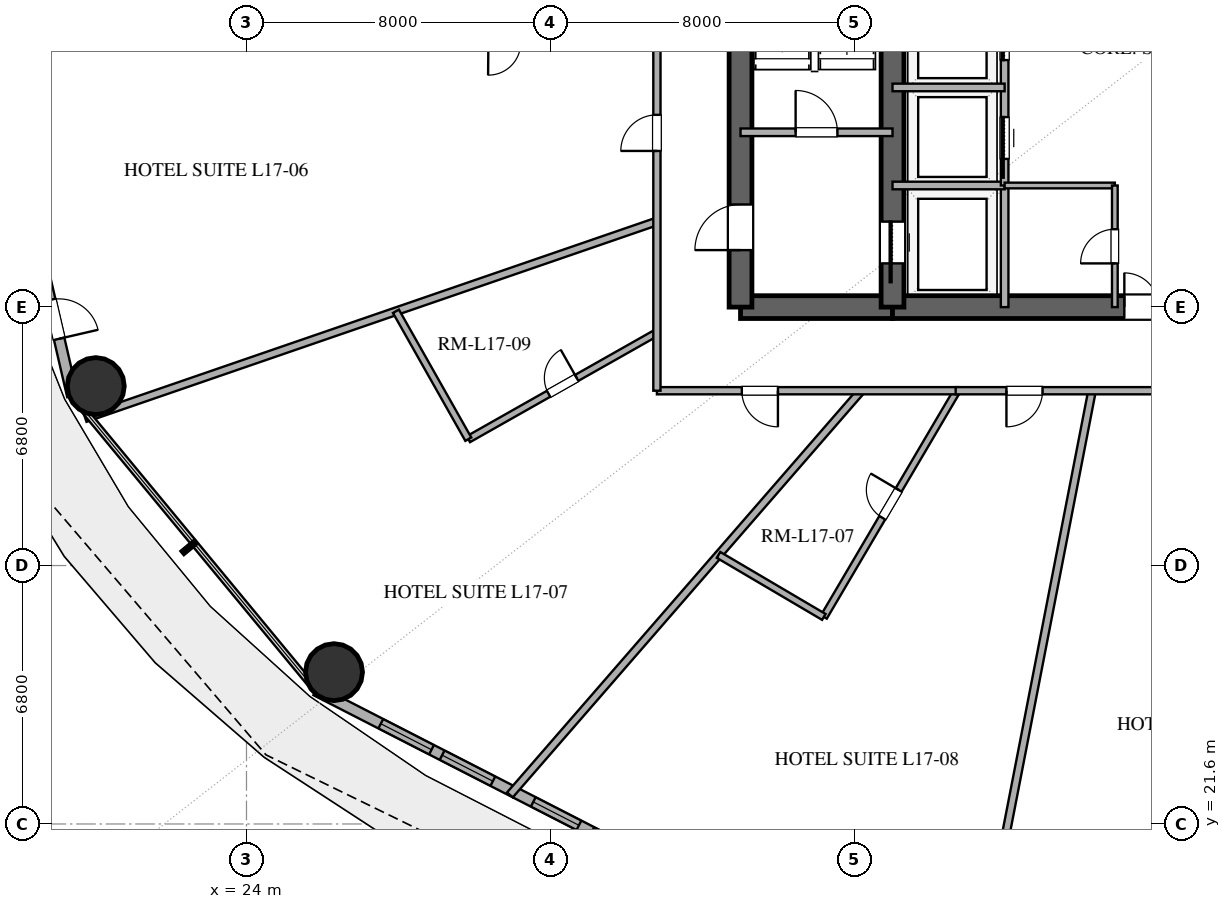
"""IFC4 building model, lengths in metres.
Left out: names, types, materials, properties, quantities, classifications, styles, units other than length and angle.
Written with IfcOpenShell. Run it as: python <this file> out.ifc"""

import sys

from ifc_helpers import new_model, si_unit, direction, frame, frame_2d, origin, origin_2d, place, context, subcontext, project, spatial, rectangle, hollow_circle, extrude, element, fill, save


model = new_model("IFC4")
c1 = context("Model", 3, precision=1e-05, world=origin(), true_north=direction((0.0, 1.0)))
c2 = subcontext(c1, "Body", "Model", "MODEL_VIEW")
j1 = project(units=[si_unit("LENGTHUNIT", "METRE"), si_unit("PLANEANGLEUNIT", "RADIAN")], contexts=[c1])
p1 = place(None, origin())
s1 = spatial("IfcSite", under=j1, at=p1, CompositionType="ELEMENT")
p2 = place(p1, origin())
s2 = spatial("IfcBuilding", under=s1, at=p2, CompositionType="ELEMENT")
p3 = place(p2, frame((0.0, 0.0, 71.4)))
s3 = spatial("IfcBuildingStorey", under=s2, at=p3, CompositionType="ELEMENT", Elevation=71.4)
p4 = place(p3, frame((37.0, 35.2, 0.0), z_axis=(0.0, 0.0, 1.0), x_axis=(1.0, 0.0, 0.0)))
e1 = element("IfcWall", 1, at=p4, inside=s3, PredefinedType="SHEAR", context=c2, shape_type="SweptSolid", body=[
    extrude(rectangle(XDim=4.0, YDim=0.6, at=frame_2d((2.0, 0.0))), origin(), (0.0, 0.0, 1.0), 3.38),
])
p5 = place(p3, frame((41.0, 35.2, 0.0), z_axis=(0.0, 0.0, 1.0), x_axis=(1.0, 0.0, 0.0)))
e2 = element("IfcWall", 2, at=p5, inside=s3, PredefinedType="SHEAR", context=c2, shape_type="SweptSolid", body=[
    extrude(rectangle(XDim=14.0, YDim=0.6, at=frame_2d((7.0, 0.0))), origin(), (0.0, 0.0, 1.0), 3.38),
])
p6 = place(p5, frame((6.1, 0.0, 0.0)))
e3 = element("IfcOpeningElement", 3, at=p6, cuts=e2, PredefinedType="OPENING", context=c2, shape_type="SweptSolid", body=[
    extrude(rectangle(XDim=1.8, YDim=2.25, at=frame_2d((0.9, 1.125))), frame((0.0, 0.31, 0.0), z_axis=(0.0, -1.0, 0.0), x_axis=(1.0, 0.0, 0.0)), (0.0, 0.0, 1.0), 0.62),
])
p7 = place(p3, frame((37.0, 35.2, 0.0), z_axis=(0.0, 0.0, 1.0), x_axis=(0.0, 1.0, 0.0)))
e4 = element("IfcWall", 4, at=p7, inside=s3, PredefinedType="SHEAR", context=c2, shape_type="SweptSolid", body=[
    extrude(rectangle(XDim=13.6, YDim=0.6, at=frame_2d((6.8, 0.0))), origin(), (0.0, 0.0, 1.0), 3.38),
])
p8 = place(p7, frame((1.5, 0.0, 0.0)))
e5 = element("IfcOpeningElement", 5, at=p8, cuts=e4, PredefinedType="OPENING", context=c2, shape_type="SweptSolid", body=[
    extrude(rectangle(XDim=1.2, YDim=2.15, at=frame_2d((0.6, 1.075))), frame((0.0, 0.31, 0.0), z_axis=(0.0, -1.0, 0.0), x_axis=(1.0, 0.0, 0.0)), (0.0, 0.0, 1.0), 0.62),
])
p9 = place(p3, frame((41.0, 35.2, 0.0), z_axis=(0.0, 0.0, 1.0), x_axis=(0.0, 1.0, 0.0)))
e6 = element("IfcWall", 6, at=p9, inside=s3, PredefinedType="SHEAR", context=c2, shape_type="SweptSolid", body=[
    extrude(rectangle(XDim=13.6, YDim=0.6, at=frame_2d((6.8, 0.0))), origin(), (0.0, 0.0, 1.0), 3.38),
])
p10 = place(p9, frame((1.15, 0.0, 0.0)))
e7 = element("IfcOpeningElement", 7, at=p10, cuts=e6, PredefinedType="OPENING", context=c2, shape_type="SweptSolid", body=[
    extrude(rectangle(XDim=1.1, YDim=2.2, at=frame_2d((0.55, 1.1))), frame((0.0, 0.31, 0.0), z_axis=(0.0, -1.0, 0.0), x_axis=(1.0, 0.0, 0.0)), (0.0, 0.0, 1.0), 0.62),
])
for number, where, z_axis, x_axis in (
    (8, (20.034, 33.122, 0.0), (0.0, 0.0, 1.0), (1.0, 0.0, 0.0)),
    (9, (26.303, 25.595, 0.0), (0.0, 0.0, 1.0), (1.0, 0.0, 0.0)),
):
    element("IfcColumn", number, at=place(p3, frame(where, z_axis=z_axis, x_axis=x_axis)), inside=s3, PredefinedType="COLUMN", context=c2, shape_type="SweptSolid", body=[
        extrude(hollow_circle(Radius=0.75, WallThickness=0.04, at=origin_2d()), origin(), (0.0, 0.0, 1.0), 3.38),
    ])
p11 = place(p3, frame((17.304, 42.0, 0.0), z_axis=(0.0, 0.0, 1.0), x_axis=(0.225454452941, -0.974253709076, 0.0)))
e10 = element("IfcWall", 10, at=p11, inside=s3, PredefinedType="SOLIDWALL", context=c2, shape_type="SweptSolid", body=[
    extrude(rectangle(XDim=9.38, YDim=0.28, at=frame_2d((4.69, 0.0))), origin(), (0.0, 0.0, 1.0), 3.38),
])
p12 = place(p11, frame((6.785, 0.0, 0.0)))
e11 = element("IfcOpeningElement", 11, at=p12, cuts=e10, PredefinedType="OPENING", context=c2, shape_type="SweptSolid", body=[
    extrude(rectangle(XDim=1.05, YDim=2.2, at=frame_2d((0.525, 1.1))), frame((0.0, 0.15, 0.0), z_axis=(0.0, -1.0, 0.0), x_axis=(1.0, 0.0, 0.0)), (0.0, 0.0, 1.0), 0.3),
])
p13 = place(p3, frame((25.826, 25.114, 0.0), z_axis=(0.0, 0.0, 1.0), x_axis=(0.889853976658, -0.456245438581, 0.0)))
e12 = element("IfcWall", 12, at=p13, inside=s3, PredefinedType="SOLIDWALL", context=c2, shape_type="SweptSolid", body=[
    extrude(rectangle(XDim=11.346, YDim=0.28, at=frame_2d((5.673, 0.0))), origin(), (0.0, 0.0, 1.0), 3.38),
])
p14 = place(p13, frame((1.92, 0.0, 0.85)))
e13 = element("IfcOpeningElement", 13, at=p14, cuts=e12, PredefinedType="OPENING", context=c2, shape_type="SweptSolid", body=[
    extrude(rectangle(XDim=1.5, YDim=1.8, at=frame_2d((0.75, 0.9))), frame((0.0, 0.15, 0.0), z_axis=(0.0, -1.0, 0.0), x_axis=(1.0, 0.0, 0.0)), (0.0, 0.0, 1.0), 0.3),
])
p15 = place(p13, frame((3.734, 0.0, 0.85)))
e14 = element("IfcOpeningElement", 14, at=p15, cuts=e12, PredefinedType="OPENING", context=c2, shape_type="SweptSolid", body=[
    extrude(rectangle(XDim=1.5, YDim=1.8, at=frame_2d((0.75, 0.9))), frame((0.0, 0.15, 0.0), z_axis=(0.0, -1.0, 0.0), x_axis=(1.0, 0.0, 0.0)), (0.0, 0.0, 1.0), 0.3),
])
p16 = place(p13, frame((6.429, 0.0, 0.85)))
e15 = element("IfcOpeningElement", 15, at=p16, cuts=e12, PredefinedType="OPENING", context=c2, shape_type="SweptSolid", body=[
    extrude(rectangle(XDim=1.35, YDim=1.8, at=frame_2d((0.675, 0.9))), frame((0.0, 0.15, 0.0), z_axis=(0.0, -1.0, 0.0), x_axis=(1.0, 0.0, 0.0)), (0.0, 0.0, 1.0), 0.3),
])
p17 = place(p13, frame((8.16, 0.0, 0.85)))
e16 = element("IfcOpeningElement", 16, at=p17, cuts=e12, PredefinedType="OPENING", context=c2, shape_type="SweptSolid", body=[
    extrude(rectangle(XDim=1.35, YDim=1.8, at=frame_2d((0.675, 0.9))), frame((0.0, 0.15, 0.0), z_axis=(0.0, -1.0, 0.0), x_axis=(1.0, 0.0, 0.0)), (0.0, 0.0, 1.0), 0.3),
])
p18 = place(p3, frame((37.0, 39.8, 0.0), z_axis=(0.0, 0.0, 1.0), x_axis=(1.0, 0.0, 0.0)))
e17 = element("IfcWall", 17, at=p18, inside=s3, PredefinedType="SOLIDWALL", context=c2, shape_type="SweptSolid", body=[
    extrude(rectangle(XDim=4.0, YDim=0.2, at=frame_2d((2.0, 0.0))), origin(), (0.0, 0.0, 1.0), 2.74),
])
p19 = place(p18, frame((1.45, 0.0, 0.0)))
e18 = element("IfcOpeningElement", 18, at=p19, cuts=e17, PredefinedType="OPENING", context=c2, shape_type="SweptSolid", body=[
    extrude(rectangle(XDim=1.1, YDim=2.15, at=frame_2d((0.55, 1.075))), frame((0.0, 0.11, 0.0), z_axis=(0.0, -1.0, 0.0), x_axis=(1.0, 0.0, 0.0)), (0.0, 0.0, 1.0), 0.22),
])
p20 = place(p3, frame((43.95, 35.2, 0.0), z_axis=(0.0, 0.0, 1.0), x_axis=(0.0, 1.0, 0.0)))
e19 = element("IfcWall", 19, at=p20, inside=s3, PredefinedType="SOLIDWALL", context=c2, shape_type="SweptSolid", body=[
    extrude(rectangle(XDim=3.2, YDim=0.2, at=frame_2d((1.6, 0.0))), origin(), (0.0, 0.0, 1.0), 2.74),
])
p21 = place(p3, frame((41.0, 38.4, 0.0), z_axis=(0.0, 0.0, 1.0), x_axis=(1.0, 0.0, 0.0)))
e20 = element("IfcWall", 20, at=p21, inside=s3, PredefinedType="SOLIDWALL", context=c2, shape_type="SweptSolid", body=[
    extrude(rectangle(XDim=2.95, YDim=0.2, at=frame_2d((1.475, 0.0))), origin(), (0.0, 0.0, 1.0), 2.74),
])
p22 = place(p3, frame((43.95, 38.4, 0.0), z_axis=(0.0, 0.0, 1.0), x_axis=(0.0, 1.0, 0.0)))
e21 = element("IfcWall", 21, at=p22, inside=s3, PredefinedType="SOLIDWALL", context=c2, shape_type="SweptSolid", body=[
    extrude(rectangle(XDim=7.8, YDim=0.2, at=frame_2d((3.9, 0.0))), origin(), (0.0, 0.0, 1.0), 2.74),
])
p23 = place(p22, frame((0.7, 0.0, 0.0)))
e22 = element("IfcOpeningElement", 22, at=p23, cuts=e21, PredefinedType="OPENING", context=c2, shape_type="SweptSolid", body=[
    extrude(rectangle(XDim=1.1, YDim=2.2, at=frame_2d((0.55, 1.1))), frame((0.0, 0.11, 0.0), z_axis=(0.0, -1.0, 0.0), x_axis=(1.0, 0.0, 0.0)), (0.0, 0.0, 1.0), 0.22),
])
p24 = place(p22, frame((3.3, 0.0, 0.0)))
e23 = element("IfcOpeningElement", 23, at=p24, cuts=e21, PredefinedType="OPENING", context=c2, shape_type="SweptSolid", body=[
    extrude(rectangle(XDim=1.1, YDim=2.2, at=frame_2d((0.55, 1.1))), frame((0.0, 0.11, 0.0), z_axis=(0.0, -1.0, 0.0), x_axis=(1.0, 0.0, 0.0)), (0.0, 0.0, 1.0), 0.22),
])
p25 = place(p3, frame((41.0, 40.98, 0.0), z_axis=(0.0, 0.0, 1.0), x_axis=(1.0, 0.0, 0.0)))
e24 = element("IfcWall", 24, at=p25, inside=s3, PredefinedType="SOLIDWALL", context=c2, shape_type="SweptSolid", body=[
    extrude(rectangle(XDim=2.95, YDim=0.2, at=frame_2d((1.475, 0.0))), origin(), (0.0, 0.0, 1.0), 2.74),
])
p26 = place(p3, frame((43.95, 38.4, 0.0), z_axis=(0.0, 0.0, 1.0), x_axis=(1.0, 0.0, 0.0)))
e25 = element("IfcWall", 25, at=p26, inside=s3, PredefinedType="PARTITIONING", context=c2, shape_type="SweptSolid", body=[
    extrude(rectangle(XDim=2.9, YDim=0.15, at=frame_2d((1.45, 0.0))), origin(), (0.0, 0.0, 1.0), 2.74),
])
p27 = place(p3, frame((46.85, 35.2, 0.0), z_axis=(0.0, 0.0, 1.0), x_axis=(0.0, 1.0, 0.0)))
e26 = element("IfcWall", 26, at=p27, inside=s3, PredefinedType="PARTITIONING", context=c2, shape_type="SweptSolid", body=[
    extrude(rectangle(XDim=3.2, YDim=0.15, at=frame_2d((1.6, 0.0))), origin(), (0.0, 0.0, 1.0), 2.74),
])
p28 = place(p27, frame((1.15, 0.0, 0.0)))
e27 = element("IfcOpeningElement", 27, at=p28, cuts=e26, PredefinedType="OPENING", context=c2, shape_type="SweptSolid", body=[
    extrude(rectangle(XDim=0.9, YDim=2.15, at=frame_2d((0.45, 1.075))), frame((0.0, 0.085, 0.0), z_axis=(0.0, -1.0, 0.0), x_axis=(1.0, 0.0, 0.0)), (0.0, 0.0, 1.0), 0.17),
])
p29 = place(p3, frame((43.467, 18.681, 0.0), z_axis=(0.0, 0.0, 1.0), x_axis=(0.190799326792, 0.981629062781, 0.0)))
e28 = element("IfcWall", 28, at=p29, inside=s3, PredefinedType="PARTITIONING", context=c2, shape_type="SweptSolid", body=[
    extrude(rectangle(XDim=14.587, YDim=0.2, at=frame_2d((7.293, 0.0))), origin(), (0.0, 0.0, 1.0), 2.74),
])
p30 = place(p3, frame((34.8, 37.455, 0.0), z_axis=(0.0, 0.0, 1.0), x_axis=(-0.945518845989, -0.325567369186, 0.0)))
e29 = element("IfcWall", 29, at=p30, inside=s3, PredefinedType="PARTITIONING", context=c2, shape_type="SweptSolid", body=[
    extrude(rectangle(XDim=15.909, YDim=0.2, at=frame_2d((7.955, 0.0))), origin(), (0.0, 0.0, 1.0), 2.74),
])
p31 = place(p3, frame((40.177, 33.0, 0.0), z_axis=(0.0, 0.0, 1.0), x_axis=(-0.656066321773, -0.754703240641, 0.0)))
e30 = element("IfcWall", 30, at=p31, inside=s3, PredefinedType="PARTITIONING", context=c2, shape_type="SweptSolid", body=[
    extrude(rectangle(XDim=14.091, YDim=0.2, at=frame_2d((7.045, 0.0))), origin(), (0.0, 0.0, 1.0), 2.74),
])
p32 = place(p3, frame((39.193, 27.048, 0.0), z_axis=(0.0, 0.0, 1.0), x_axis=(0.507529744585, 0.861634236995, 0.0)))
e31 = element("IfcWall", 31, at=p32, inside=s3, PredefinedType="PLUMBINGWALL", context=c2, shape_type="SweptSolid", body=[
    extrude(rectangle(XDim=6.908, YDim=0.18, at=frame_2d((3.454, 0.0))), origin(), (0.0, 0.0, 1.0), 2.74),
])
p33 = place(p32, frame((3.029, 0.0, 0.0)))
e32 = element("IfcOpeningElement", 32, at=p33, cuts=e31, PredefinedType="OPENING", context=c2, shape_type="SweptSolid", body=[
    extrude(rectangle(XDim=0.85, YDim=2.1, at=frame_2d((0.425, 1.05))), frame((0.0, 0.1, 0.0), z_axis=(0.0, -1.0, 0.0), x_axis=(1.0, 0.0, 0.0)), (0.0, 0.0, 1.0), 0.2),
])
p34 = place(p3, frame((29.837, 31.724, 0.0), z_axis=(0.0, 0.0, 1.0), x_axis=(0.870364197206, 0.492408533865, 0.0)))
e33 = element("IfcWall", 33, at=p34, inside=s3, PredefinedType="PLUMBINGWALL", context=c2, shape_type="SweptSolid", body=[
    extrude(rectangle(XDim=5.702, YDim=0.18, at=frame_2d((2.851, 0.0))), origin(), (0.0, 0.0, 1.0), 2.74),
])
p35 = place(p34, frame((2.426, 0.0, 0.0)))
e34 = element("IfcOpeningElement", 34, at=p35, cuts=e33, PredefinedType="OPENING", context=c2, shape_type="SweptSolid", body=[
    extrude(rectangle(XDim=0.85, YDim=2.1, at=frame_2d((0.425, 1.05))), frame((0.0, 0.1, 0.0), z_axis=(0.0, -1.0, 0.0), x_axis=(1.0, 0.0, 0.0)), (0.0, 0.0, 1.0), 0.2),
])
p36 = place(p3, frame((42.736, 33.0, 0.0), z_axis=(0.0, 0.0, 1.0), x_axis=(-1.0, 0.0, 0.0)))
e35 = element("IfcWall", 35, at=p36, inside=s3, PredefinedType="PARTITIONING", context=c2, shape_type="SweptSolid", body=[
    extrude(rectangle(XDim=7.936, YDim=0.19, at=frame_2d((3.968, 0.0))), origin(), (0.0, 0.0, 1.0), 2.74),
])
p37 = place(p36, frame((4.751, 0.0, 0.0)))
e36 = element("IfcOpeningElement", 36, at=p37, cuts=e35, PredefinedType="OPENING", context=c2, shape_type="SweptSolid", body=[
    extrude(rectangle(XDim=0.95, YDim=2.15, at=frame_2d((0.475, 1.075))), frame((0.0, 0.105, 0.0), z_axis=(0.0, -1.0, 0.0), x_axis=(1.0, 0.0, 0.0)), (0.0, 0.0, 1.0), 0.21),
])
p38 = place(p3, frame((51.133, 33.0, 0.0), z_axis=(0.0, 0.0, 1.0), x_axis=(-1.0, 0.0, 0.0)))
e37 = element("IfcWall", 37, at=p38, inside=s3, PredefinedType="PARTITIONING", context=c2, shape_type="SweptSolid", body=[
    extrude(rectangle(XDim=8.471, YDim=0.19, at=frame_2d((4.236, 0.0))), origin(), (0.0, 0.0, 1.0), 2.74),
])
p39 = place(p38, frame((1.957, 0.0, 0.0)))
e38 = element("IfcOpeningElement", 38, at=p39, cuts=e37, PredefinedType="OPENING", context=c2, shape_type="SweptSolid", body=[
    extrude(rectangle(XDim=1.0, YDim=2.2, at=frame_2d((0.5, 1.1))), frame((0.0, 0.105, 0.0), z_axis=(0.0, -1.0, 0.0), x_axis=(1.0, 0.0, 0.0)), (0.0, 0.0, 1.0), 0.21),
])
p40 = place(p38, frame((6.185, 0.0, 0.0)))
e39 = element("IfcOpeningElement", 39, at=p40, cuts=e37, PredefinedType="OPENING", context=c2, shape_type="SweptSolid", body=[
    extrude(rectangle(XDim=0.95, YDim=2.15, at=frame_2d((0.475, 1.075))), frame((0.0, 0.105, 0.0), z_axis=(0.0, -1.0, 0.0), x_axis=(1.0, 0.0, 0.0)), (0.0, 0.0, 1.0), 0.21),
])
p41 = place(p3, frame((34.8, 33.0, 0.0), z_axis=(0.0, 0.0, 1.0), x_axis=(0.0, 1.0, 0.0)))
e40 = element("IfcWall", 40, at=p41, inside=s3, PredefinedType="PARTITIONING", context=c2, shape_type="SweptSolid", body=[
    extrude(rectangle(XDim=9.147, YDim=0.19, at=frame_2d((4.574, 0.0))), origin(), (0.0, 0.0, 1.0), 2.74),
])
p42 = place(p41, frame((6.309, 0.0, 0.0)))
e41 = element("IfcOpeningElement", 41, at=p42, cuts=e40, PredefinedType="OPENING", context=c2, shape_type="SweptSolid", body=[
    extrude(rectangle(XDim=0.95, YDim=2.15, at=frame_2d((0.475, 1.075))), frame((0.0, 0.105, 0.0), z_axis=(0.0, -1.0, 0.0), x_axis=(1.0, 0.0, 0.0)), (0.0, 0.0, 1.0), 0.21),
])
p43 = place(p3, frame((27.933, 35.09, 0.0), z_axis=(0.0, 0.0, 1.0), x_axis=(0.492429534147, -0.870352315962, 0.0)))
e42 = element("IfcWall", 42, at=p43, inside=s3, PredefinedType="PLUMBINGWALL", context=c2, shape_type="SweptSolid", body=[
    extrude(rectangle(XDim=3.868, YDim=0.18, at=frame_2d((1.934, 0.0))), origin(), (0.0, 0.0, 1.0), 2.74),
])
p44 = place(p3, frame((36.421, 28.68, 0.0), z_axis=(0.0, 0.0, 1.0), x_axis=(0.861637458593, -0.507524275232, 0.0)))
e43 = element("IfcWall", 43, at=p44, inside=s3, PredefinedType="PLUMBINGWALL", context=c2, shape_type="SweptSolid", body=[
    extrude(rectangle(XDim=3.216, YDim=0.18, at=frame_2d((1.608, 0.0))), origin(), (0.0, 0.0, 1.0), 2.74),
])
p45 = place(p12, origin())
e44 = element("IfcDoor", 44, at=p45, inside=s3, OperationType="SINGLE_SWING_RIGHT", PredefinedType="DOOR", context=c2, shape_type="SweptSolid", body=[
    extrude(rectangle(XDim=1.05, YDim=2.2, at=frame_2d((0.525, 1.1))), frame((0.0, 0.025, 0.0), z_axis=(0.0, -1.0, 0.0), x_axis=(1.0, 0.0, 0.0)), (0.0, 0.0, 1.0), 0.05),
])
fill(e11, e44)
p46 = place(p14, origin())
e45 = element("IfcWindow", 45, at=p46, inside=s3, PartitioningType="SINGLE_PANEL", PredefinedType="WINDOW", context=c2, shape_type="SweptSolid", body=[
    extrude(rectangle(XDim=1.5, YDim=1.8, at=frame_2d((0.75, 0.9))), frame((0.0, 0.03, 0.0), z_axis=(0.0, -1.0, 0.0), x_axis=(1.0, 0.0, 0.0)), (0.0, 0.0, 1.0), 0.06),
])
fill(e13, e45)
p47 = place(p15, origin())
e46 = element("IfcWindow", 46, at=p47, inside=s3, PartitioningType="SINGLE_PANEL", PredefinedType="WINDOW", context=c2, shape_type="SweptSolid", body=[
    extrude(rectangle(XDim=1.5, YDim=1.8, at=frame_2d((0.75, 0.9))), frame((0.0, 0.03, 0.0), z_axis=(0.0, -1.0, 0.0), x_axis=(1.0, 0.0, 0.0)), (0.0, 0.0, 1.0), 0.06),
])
fill(e14, e46)
p48 = place(p16, origin())
e47 = element("IfcWindow", 47, at=p48, inside=s3, PartitioningType="SINGLE_PANEL", PredefinedType="WINDOW", context=c2, shape_type="SweptSolid", body=[
    extrude(rectangle(XDim=1.35, YDim=1.8, at=frame_2d((0.675, 0.9))), frame((0.0, 0.03, 0.0), z_axis=(0.0, -1.0, 0.0), x_axis=(1.0, 0.0, 0.0)), (0.0, 0.0, 1.0), 0.06),
])
fill(e15, e47)
p49 = place(p10, origin())
e48 = element("IfcDoor", 48, at=p49, inside=s3, OperationType="SLIDING_TO_LEFT", PredefinedType="DOOR", context=c2, shape_type="SweptSolid", body=[
    extrude(rectangle(XDim=1.1, YDim=2.2, at=frame_2d((0.55, 1.1))), frame((0.0, 0.025, 0.0), z_axis=(0.0, -1.0, 0.0), x_axis=(1.0, 0.0, 0.0)), (0.0, 0.0, 1.0), 0.05),
])
fill(e7, e48)
p50 = place(p8, origin())
e49 = element("IfcDoor", 49, at=p50, inside=s3, OperationType="SINGLE_SWING_LEFT", PredefinedType="DOOR", context=c2, shape_type="SweptSolid", body=[
    extrude(rectangle(XDim=1.2, YDim=2.15, at=frame_2d((0.6, 1.075))), frame((0.0, 0.025, 0.0), z_axis=(0.0, -1.0, 0.0), x_axis=(1.0, 0.0, 0.0)), (0.0, 0.0, 1.0), 0.05),
])
fill(e5, e49)
p51 = place(p6, origin())
e50 = element("IfcDoor", 50, at=p51, inside=s3, OperationType="DOUBLE_DOOR_SINGLE_SWING", PredefinedType="DOOR", context=c2, shape_type="SweptSolid", body=[
    extrude(rectangle(XDim=1.8, YDim=2.25, at=frame_2d((0.9, 1.125))), frame((0.0, 0.025, 0.0), z_axis=(0.0, -1.0, 0.0), x_axis=(1.0, 0.0, 0.0)), (0.0, 0.0, 1.0), 0.05),
])
fill(e3, e50)
p52 = place(p19, origin())
e51 = element("IfcDoor", 51, at=p52, inside=s3, OperationType="SINGLE_SWING_LEFT", PredefinedType="DOOR", context=c2, shape_type="SweptSolid", body=[
    extrude(rectangle(XDim=1.1, YDim=2.15, at=frame_2d((0.55, 1.075))), frame((0.0, 0.025, 0.0), z_axis=(0.0, -1.0, 0.0), x_axis=(1.0, 0.0, 0.0)), (0.0, 0.0, 1.0), 0.05),
])
fill(e18, e51)
p53 = place(p23, origin())
e52 = element("IfcDoor", 52, at=p53, inside=s3, OperationType="SLIDING_TO_LEFT", PredefinedType="DOOR", context=c2, shape_type="SweptSolid", body=[
    extrude(rectangle(XDim=1.1, YDim=2.2, at=frame_2d((0.55, 1.1))), frame((0.0, 0.025, 0.0), z_axis=(0.0, -1.0, 0.0), x_axis=(1.0, 0.0, 0.0)), (0.0, 0.0, 1.0), 0.05),
])
fill(e22, e52)
p54 = place(p24, origin())
e53 = element("IfcDoor", 53, at=p54, inside=s3, OperationType="SLIDING_TO_RIGHT", PredefinedType="DOOR", context=c2, shape_type="SweptSolid", body=[
    extrude(rectangle(XDim=1.1, YDim=2.2, at=frame_2d((0.55, 1.1))), frame((0.0, 0.025, 0.0), z_axis=(0.0, -1.0, 0.0), x_axis=(1.0, 0.0, 0.0)), (0.0, 0.0, 1.0), 0.05),
])
fill(e23, e53)
p55 = place(p28, origin())
e54 = element("IfcDoor", 54, at=p55, inside=s3, OperationType="SINGLE_SWING_LEFT", PredefinedType="DOOR", context=c2, shape_type="SweptSolid", body=[
    extrude(rectangle(XDim=0.9, YDim=2.15, at=frame_2d((0.45, 1.075))), frame((0.0, 0.025, 0.0), z_axis=(0.0, -1.0, 0.0), x_axis=(1.0, 0.0, 0.0)), (0.0, 0.0, 1.0), 0.05),
])
fill(e27, e54)
p56 = place(p33, origin())
e55 = element("IfcDoor", 55, at=p56, inside=s3, OperationType="SINGLE_SWING_RIGHT", PredefinedType="DOOR", context=c2, shape_type="SweptSolid", body=[
    extrude(rectangle(XDim=0.85, YDim=2.1, at=frame_2d((0.425, 1.05))), frame((0.0, 0.025, 0.0), z_axis=(0.0, -1.0, 0.0), x_axis=(1.0, 0.0, 0.0)), (0.0, 0.0, 1.0), 0.05),
])
fill(e32, e55)
p57 = place(p35, origin())
e56 = element("IfcDoor", 56, at=p57, inside=s3, OperationType="SINGLE_SWING_RIGHT", PredefinedType="DOOR", context=c2, shape_type="SweptSolid", body=[
    extrude(rectangle(XDim=0.85, YDim=2.1, at=frame_2d((0.425, 1.05))), frame((0.0, 0.025, 0.0), z_axis=(0.0, -1.0, 0.0), x_axis=(1.0, 0.0, 0.0)), (0.0, 0.0, 1.0), 0.05),
])
fill(e34, e56)
p58 = place(p37, origin())
e57 = element("IfcDoor", 57, at=p58, inside=s3, OperationType="SINGLE_SWING_LEFT", PredefinedType="DOOR", context=c2, shape_type="SweptSolid", body=[
    extrude(rectangle(XDim=0.95, YDim=2.15, at=frame_2d((0.475, 1.075))), frame((0.0, 0.025, 0.0), z_axis=(0.0, -1.0, 0.0), x_axis=(1.0, 0.0, 0.0)), (0.0, 0.0, 1.0), 0.05),
])
fill(e36, e57)
p59 = place(p40, origin())
e58 = element("IfcDoor", 58, at=p59, inside=s3, OperationType="SINGLE_SWING_RIGHT", PredefinedType="DOOR", context=c2, shape_type="SweptSolid", body=[
    extrude(rectangle(XDim=0.95, YDim=2.15, at=frame_2d((0.475, 1.075))), frame((0.0, 0.025, 0.0), z_axis=(0.0, -1.0, 0.0), x_axis=(1.0, 0.0, 0.0)), (0.0, 0.0, 1.0), 0.05),
])
fill(e39, e58)
p60 = place(p42, origin())
e59 = element("IfcDoor", 59, at=p60, inside=s3, OperationType="SINGLE_SWING_LEFT", PredefinedType="DOOR", context=c2, shape_type="SweptSolid", body=[
    extrude(rectangle(XDim=0.95, YDim=2.15, at=frame_2d((0.475, 1.075))), frame((0.0, 0.025, 0.0), z_axis=(0.0, -1.0, 0.0), x_axis=(1.0, 0.0, 0.0)), (0.0, 0.0, 1.0), 0.05),
])
fill(e41, e59)
save(model, sys.argv[1])
